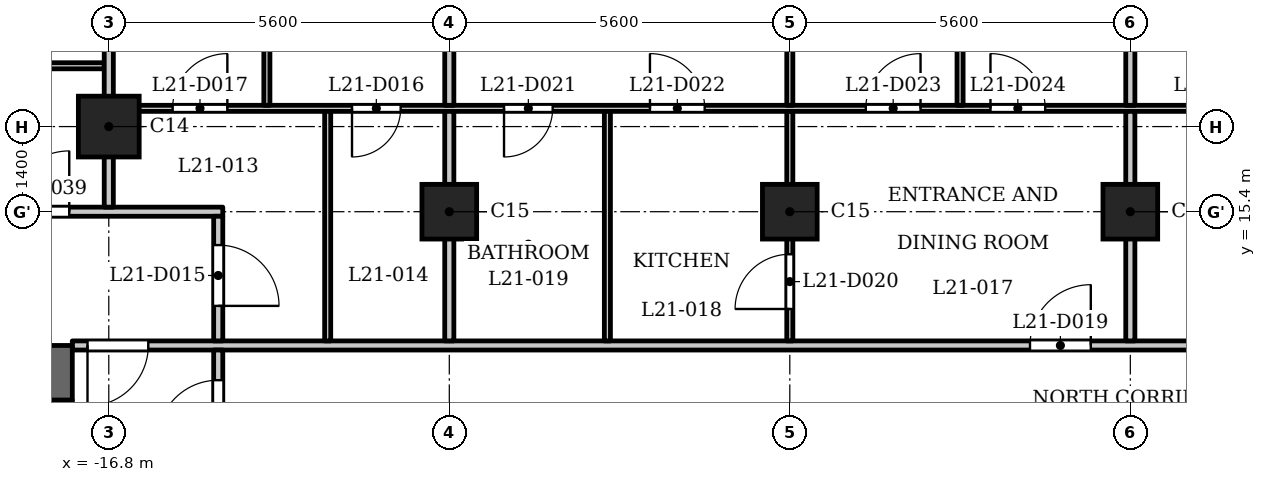
"""IFC4 building model, lengths in metres.
Left out: names, types, materials, properties, quantities, classifications, styles, units other than length and angle.
Written with IfcOpenShell. Run it as: python <this file> out.ifc"""

import sys

from ifc_helpers import new_model, si_unit, direction, frame, frame_2d, origin, origin_2d, place, context, subcontext, project, spatial, rectangle, extrude, element, fill, save


model = new_model("IFC4")
c1 = context("Model", 3, precision=1e-05, world=origin(), true_north=direction((0.0, 1.0)))
c2 = subcontext(c1, "Body", "Model", "MODEL_VIEW")
j1 = project(units=[si_unit("LENGTHUNIT", "METRE"), si_unit("PLANEANGLEUNIT", "RADIAN")], contexts=[c1])
p1 = place(None, origin())
s1 = spatial("IfcSite", under=j1, at=p1, CompositionType="ELEMENT")
p2 = place(p1, origin())
s2 = spatial("IfcBuilding", under=s1, at=p2, CompositionType="ELEMENT")
p3 = place(p2, frame((0.0, 0.0, 86.8)))
s3 = spatial("IfcBuildingStorey", under=s2, at=p3, CompositionType="ELEMENT", Elevation=86.8)
p4 = place(p3, frame((-16.8, 16.8, 0.0), z_axis=(0.0, 0.0, 1.0), x_axis=(1.0, 0.0, 0.0)))
e1 = element("IfcColumn", 1, at=p4, inside=s3, PredefinedType="COLUMN", context=c2, shape_type="SweptSolid", body=[
    extrude(rectangle(XDim=1.0, YDim=1.0, at=origin_2d()), origin(), (0.0, 0.0, 1.0), 3.5),
])
for number, where, z_axis, x_axis in (
    (2, (-11.2, 15.4, 0.0), (0.0, 0.0, 1.0), (1.0, 0.0, 0.0)),
    (3, (-5.6, 15.4, 0.0), (0.0, 0.0, 1.0), (1.0, 0.0, 0.0)),
    (4, (0.0, 15.4, 0.0), (0.0, 0.0, 1.0), (1.0, 0.0, 0.0)),
):
    element("IfcColumn", number, at=place(p3, frame(where, z_axis=z_axis, x_axis=x_axis)), inside=s3, PredefinedType="COLUMN", context=c2, shape_type="SweptSolid", body=[
        extrude(rectangle(XDim=0.9, YDim=0.9, at=origin_2d()), origin(), (0.0, 0.0, 1.0), 3.5),
    ])
p5 = place(p3, frame((-17.4, 12.75, 0.0), z_axis=(0.0, 0.0, 1.0), x_axis=(-1.0, 0.0, 0.0)))
e5 = element("IfcWall", 5, at=p5, inside=s3, PredefinedType="SHEAR", context=c2, shape_type="SweptSolid", body=[
    extrude(rectangle(XDim=10.4, YDim=0.9, at=frame_2d((5.2, 0.0))), origin(), (0.0, 0.0, 1.0), 3.2),
])
p6 = place(p3, frame((-17.6, -12.3, 0.0), z_axis=(0.0, 0.0, 1.0), x_axis=(0.0, 1.0, 0.0)))
e6 = element("IfcWall", 6, at=p6, inside=s3, PredefinedType="SHEAR", context=c2, shape_type="SweptSolid", body=[
    extrude(rectangle(XDim=24.6, YDim=0.4, at=frame_2d((12.3, 0.0))), origin(), (0.0, 0.0, 1.0), 3.2),
])
p7 = place(p6, frame((6.0, 0.0, 0.0)))
e7 = element("IfcOpeningElement", 7, at=p7, cuts=e6, PredefinedType="OPENING", context=c2, shape_type="SweptSolid", body=[
    extrude(rectangle(XDim=1.1, YDim=2.1, at=frame_2d((0.55, 1.05))), frame((0.0, 0.21, 0.0), z_axis=(0.0, -1.0, 0.0), x_axis=(1.0, 0.0, 0.0)), (0.0, 0.0, 1.0), 0.42),
])
p8 = place(p6, frame((8.4, 0.0, 0.0)))
e8 = element("IfcOpeningElement", 8, at=p8, cuts=e6, PredefinedType="OPENING", context=c2, shape_type="SweptSolid", body=[
    extrude(rectangle(XDim=1.1, YDim=2.1, at=frame_2d((0.55, 1.05))), frame((0.0, 0.21, 0.0), z_axis=(0.0, -1.0, 0.0), x_axis=(1.0, 0.0, 0.0)), (0.0, 0.0, 1.0), 0.42),
])
p9 = place(p6, frame((10.8, 0.0, 0.0)))
e9 = element("IfcOpeningElement", 9, at=p9, cuts=e6, PredefinedType="OPENING", context=c2, shape_type="SweptSolid", body=[
    extrude(rectangle(XDim=1.1, YDim=2.1, at=frame_2d((0.55, 1.05))), frame((0.0, 0.21, 0.0), z_axis=(0.0, -1.0, 0.0), x_axis=(1.0, 0.0, 0.0)), (0.0, 0.0, 1.0), 0.42),
])
p10 = place(p6, frame((16.75, 0.0, 0.0)))
e10 = element("IfcOpeningElement", 10, at=p10, cuts=e6, PredefinedType="OPENING", context=c2, shape_type="SweptSolid", body=[
    extrude(rectangle(XDim=0.9, YDim=2.1, at=frame_2d((0.45, 1.05))), frame((0.0, 0.21, 0.0), z_axis=(0.0, -1.0, 0.0), x_axis=(1.0, 0.0, 0.0)), (0.0, 0.0, 1.0), 0.42),
])
p11 = place(p6, frame((22.8, 0.0, 0.0)))
e11 = element("IfcOpeningElement", 11, at=p11, cuts=e6, PredefinedType="OPENING", context=c2, shape_type="SweptSolid", body=[
    extrude(rectangle(XDim=1.1, YDim=2.1, at=frame_2d((0.55, 1.05))), frame((0.0, 0.21, 0.0), z_axis=(0.0, -1.0, 0.0), x_axis=(1.0, 0.0, 0.0)), (0.0, 0.0, 1.0), 0.42),
])
p12 = place(p6, frame((0.7, 0.0, 0.0)))
e12 = element("IfcOpeningElement", 12, at=p12, cuts=e6, PredefinedType="OPENING", context=c2, shape_type="SweptSolid", body=[
    extrude(rectangle(XDim=1.1, YDim=2.1, at=frame_2d((0.55, 1.05))), frame((0.0, 0.21, 0.0), z_axis=(0.0, -1.0, 0.0), x_axis=(1.0, 0.0, 0.0)), (0.0, 0.0, 1.0), 0.42),
])
p13 = place(p6, frame((12.775, 0.0, 0.0)))
e13 = element("IfcOpeningElement", 13, at=p13, cuts=e6, PredefinedType="OPENING", context=c2, shape_type="SweptSolid", body=[
    extrude(rectangle(XDim=1.8, YDim=2.1, at=frame_2d((0.9, 1.05))), frame((0.0, 0.21, 0.0), z_axis=(0.0, -1.0, 0.0), x_axis=(1.0, 0.0, 0.0)), (0.0, 0.0, 1.0), 0.42),
])
p14 = place(p3, frame((-17.4, 13.2, 0.0), z_axis=(0.0, 0.0, 1.0), x_axis=(1.0, 0.0, 0.0)))
e14 = element("IfcWall", 14, at=p14, inside=s3, PredefinedType="PARTITIONING", context=c2, shape_type="SweptSolid", body=[
    extrude(rectangle(XDim=34.8, YDim=0.15, at=frame_2d((17.4, 0.0))), origin(), (0.0, 0.0, 1.0), 3.2),
])
p15 = place(p14, frame((0.25, 0.0, 0.0)))
e15 = element("IfcOpeningElement", 15, at=p15, cuts=e14, PredefinedType="OPENING", context=c2, shape_type="SweptSolid", body=[
    extrude(rectangle(XDim=1.0, YDim=2.1, at=frame_2d((0.5, 1.05))), frame((0.0, 0.085, 0.0), z_axis=(0.0, -1.0, 0.0), x_axis=(1.0, 0.0, 0.0)), (0.0, 0.0, 1.0), 0.17),
])
p16 = place(p14, frame((33.65, 0.0, 0.0)))
e16 = element("IfcOpeningElement", 16, at=p16, cuts=e14, PredefinedType="OPENING", context=c2, shape_type="SweptSolid", body=[
    extrude(rectangle(XDim=1.0, YDim=2.1, at=frame_2d((0.5, 1.05))), frame((0.0, 0.085, 0.0), z_axis=(0.0, -1.0, 0.0), x_axis=(1.0, 0.0, 0.0)), (0.0, 0.0, 1.0), 0.17),
])
p17 = place(p14, frame((15.75, 0.0, 0.0)))
e17 = element("IfcOpeningElement", 17, at=p17, cuts=e14, PredefinedType="OPENING", context=c2, shape_type="SweptSolid", body=[
    extrude(rectangle(XDim=1.0, YDim=2.1, at=frame_2d((0.5, 1.05))), frame((0.0, 0.085, 0.0), z_axis=(0.0, -1.0, 0.0), x_axis=(1.0, 0.0, 0.0)), (0.0, 0.0, 1.0), 0.17),
])
p18 = place(p14, frame((21.35, 0.0, 0.0)))
e18 = element("IfcOpeningElement", 18, at=p18, cuts=e14, PredefinedType="OPENING", context=c2, shape_type="SweptSolid", body=[
    extrude(rectangle(XDim=1.0, YDim=2.1, at=frame_2d((0.5, 1.05))), frame((0.0, 0.085, 0.0), z_axis=(0.0, -1.0, 0.0), x_axis=(1.0, 0.0, 0.0)), (0.0, 0.0, 1.0), 0.17),
])
p19 = place(p3, frame((-27.484, 15.4, 0.0), z_axis=(0.0, 0.0, 1.0), x_axis=(1.0, 0.0, 0.0)))
e19 = element("IfcWall", 19, at=p19, inside=s3, PredefinedType="PARTITIONING", context=c2, shape_type="SweptSolid", body=[
    extrude(rectangle(XDim=12.559, YDim=0.15, at=frame_2d((6.279, 0.0))), origin(), (0.0, 0.0, 1.0), 3.2),
])
p20 = place(p19, frame((9.034, 0.0, 0.0)))
e20 = element("IfcOpeningElement", 20, at=p20, cuts=e19, PredefinedType="OPENING", context=c2, shape_type="SweptSolid", body=[
    extrude(rectangle(XDim=1.0, YDim=2.1, at=frame_2d((0.5, 1.05))), frame((0.0, 0.085, 0.0), z_axis=(0.0, -1.0, 0.0), x_axis=(1.0, 0.0, 0.0)), (0.0, 0.0, 1.0), 0.17),
])
p21 = place(p3, frame((-16.725, 17.1, 0.0), z_axis=(0.0, 0.0, 1.0), x_axis=(1.0, 0.0, 0.0)))
e21 = element("IfcWall", 21, at=p21, inside=s3, PredefinedType="PARTITIONING", context=c2, shape_type="SweptSolid", body=[
    extrude(rectangle(XDim=33.45, YDim=0.1, at=frame_2d((16.725, 0.0))), origin(), (0.0, 0.0, 1.0), 3.2),
])
p22 = place(p21, frame((3.925, 0.0, 0.0)))
e22 = element("IfcOpeningElement", 22, at=p22, cuts=e21, PredefinedType="OPENING", context=c2, shape_type="SweptSolid", body=[
    extrude(rectangle(XDim=0.8, YDim=2.1, at=frame_2d((0.4, 1.05))), frame((0.0, 0.06, 0.0), z_axis=(0.0, -1.0, 0.0), x_axis=(1.0, 0.0, 0.0)), (0.0, 0.0, 1.0), 0.12),
])
p23 = place(p21, frame((0.975, 0.0, 0.0)))
e23 = element("IfcOpeningElement", 23, at=p23, cuts=e21, PredefinedType="OPENING", context=c2, shape_type="SweptSolid", body=[
    extrude(rectangle(XDim=0.9, YDim=2.1, at=frame_2d((0.45, 1.05))), frame((0.0, 0.06, 0.0), z_axis=(0.0, -1.0, 0.0), x_axis=(1.0, 0.0, 0.0)), (0.0, 0.0, 1.0), 0.12),
])
p24 = place(p21, frame((6.425, 0.0, 0.0)))
e24 = element("IfcOpeningElement", 24, at=p24, cuts=e21, PredefinedType="OPENING", context=c2, shape_type="SweptSolid", body=[
    extrude(rectangle(XDim=0.8, YDim=2.1, at=frame_2d((0.4, 1.05))), frame((0.0, 0.06, 0.0), z_axis=(0.0, -1.0, 0.0), x_axis=(1.0, 0.0, 0.0)), (0.0, 0.0, 1.0), 0.12),
])
p25 = place(p21, frame((8.825, 0.0, 0.0)))
e25 = element("IfcOpeningElement", 25, at=p25, cuts=e21, PredefinedType="OPENING", context=c2, shape_type="SweptSolid", body=[
    extrude(rectangle(XDim=0.9, YDim=2.1, at=frame_2d((0.45, 1.05))), frame((0.0, 0.06, 0.0), z_axis=(0.0, -1.0, 0.0), x_axis=(1.0, 0.0, 0.0)), (0.0, 0.0, 1.0), 0.12),
])
p26 = place(p21, frame((12.375, 0.0, 0.0)))
e26 = element("IfcOpeningElement", 26, at=p26, cuts=e21, PredefinedType="OPENING", context=c2, shape_type="SweptSolid", body=[
    extrude(rectangle(XDim=0.9, YDim=2.1, at=frame_2d((0.45, 1.05))), frame((0.0, 0.06, 0.0), z_axis=(0.0, -1.0, 0.0), x_axis=(1.0, 0.0, 0.0)), (0.0, 0.0, 1.0), 0.12),
])
p27 = place(p21, frame((14.425, 0.0, 0.0)))
e27 = element("IfcOpeningElement", 27, at=p27, cuts=e21, PredefinedType="OPENING", context=c2, shape_type="SweptSolid", body=[
    extrude(rectangle(XDim=0.9, YDim=2.1, at=frame_2d((0.45, 1.05))), frame((0.0, 0.06, 0.0), z_axis=(0.0, -1.0, 0.0), x_axis=(1.0, 0.0, 0.0)), (0.0, 0.0, 1.0), 0.12),
])
p28 = place(p21, frame((26.225, 0.0, 0.0)))
e28 = element("IfcOpeningElement", 28, at=p28, cuts=e21, PredefinedType="OPENING", context=c2, shape_type="SweptSolid", body=[
    extrude(rectangle(XDim=0.8, YDim=2.1, at=frame_2d((0.4, 1.05))), frame((0.0, 0.06, 0.0), z_axis=(0.0, -1.0, 0.0), x_axis=(1.0, 0.0, 0.0)), (0.0, 0.0, 1.0), 0.12),
])
p29 = place(p21, frame((23.025, 0.0, 0.0)))
e29 = element("IfcOpeningElement", 29, at=p29, cuts=e21, PredefinedType="OPENING", context=c2, shape_type="SweptSolid", body=[
    extrude(rectangle(XDim=0.9, YDim=2.1, at=frame_2d((0.45, 1.05))), frame((0.0, 0.06, 0.0), z_axis=(0.0, -1.0, 0.0), x_axis=(1.0, 0.0, 0.0)), (0.0, 0.0, 1.0), 0.12),
])
p30 = place(p21, frame((17.775, 0.0, 0.0)))
e30 = element("IfcOpeningElement", 30, at=p30, cuts=e21, PredefinedType="OPENING", context=c2, shape_type="SweptSolid", body=[
    extrude(rectangle(XDim=0.9, YDim=2.1, at=frame_2d((0.45, 1.05))), frame((0.0, 0.06, 0.0), z_axis=(0.0, -1.0, 0.0), x_axis=(1.0, 0.0, 0.0)), (0.0, 0.0, 1.0), 0.12),
])
p31 = place(p21, frame((20.025, 0.0, 0.0)))
e31 = element("IfcOpeningElement", 31, at=p31, cuts=e21, PredefinedType="OPENING", context=c2, shape_type="SweptSolid", body=[
    extrude(rectangle(XDim=0.9, YDim=2.1, at=frame_2d((0.45, 1.05))), frame((0.0, 0.06, 0.0), z_axis=(0.0, -1.0, 0.0), x_axis=(1.0, 0.0, 0.0)), (0.0, 0.0, 1.0), 0.12),
])
p32 = place(p21, frame((28.825, 0.0, 0.0)))
e32 = element("IfcOpeningElement", 32, at=p32, cuts=e21, PredefinedType="OPENING", context=c2, shape_type="SweptSolid", body=[
    extrude(rectangle(XDim=0.8, YDim=2.1, at=frame_2d((0.4, 1.05))), frame((0.0, 0.06, 0.0), z_axis=(0.0, -1.0, 0.0), x_axis=(1.0, 0.0, 0.0)), (0.0, 0.0, 1.0), 0.12),
])
p33 = place(p21, frame((31.975, 0.0, 0.0)))
e33 = element("IfcOpeningElement", 33, at=p33, cuts=e21, PredefinedType="OPENING", context=c2, shape_type="SweptSolid", body=[
    extrude(rectangle(XDim=0.9, YDim=2.1, at=frame_2d((0.45, 1.05))), frame((0.0, 0.06, 0.0), z_axis=(0.0, -1.0, 0.0), x_axis=(1.0, 0.0, 0.0)), (0.0, 0.0, 1.0), 0.12),
])
p34 = place(p3, frame((-26.554, 17.8, 0.0), z_axis=(0.0, 0.0, 1.0), x_axis=(1.0, 0.0, 0.0)))
e34 = element("IfcWall", 34, at=p34, inside=s3, PredefinedType="PARTITIONING", context=c2, shape_type="SweptSolid", body=[
    extrude(rectangle(XDim=9.679, YDim=0.1, at=frame_2d((4.84, 0.0))), origin(), (0.0, 0.0, 1.0), 3.2),
])
p35 = place(p34, frame((2.786, 0.0, 0.0)))
e35 = element("IfcOpeningElement", 35, at=p35, cuts=e34, PredefinedType="OPENING", context=c2, shape_type="SweptSolid", body=[
    extrude(rectangle(XDim=0.8, YDim=2.1, at=frame_2d((0.4, 1.05))), frame((0.0, 0.06, 0.0), z_axis=(0.0, -1.0, 0.0), x_axis=(1.0, 0.0, 0.0)), (0.0, 0.0, 1.0), 0.12),
])
p36 = place(p34, frame((7.204, 0.0, 0.0)))
e36 = element("IfcOpeningElement", 36, at=p36, cuts=e34, PredefinedType="OPENING", context=c2, shape_type="SweptSolid", body=[
    extrude(rectangle(XDim=0.9, YDim=2.1, at=frame_2d((0.45, 1.05))), frame((0.0, 0.06, 0.0), z_axis=(0.0, -1.0, 0.0), x_axis=(1.0, 0.0, 0.0)), (0.0, 0.0, 1.0), 0.12),
])
p37 = place(p3, frame((-16.8, 15.475, 0.0), z_axis=(0.0, 0.0, 1.0), x_axis=(0.0, 1.0, 0.0)))
e37 = element("IfcWall", 37, at=p37, inside=s3, PredefinedType="PARTITIONING", context=c2, shape_type="SweptSolid", body=[
    extrude(rectangle(XDim=7.555, YDim=0.15, at=frame_2d((3.777, 0.0))), origin(), (0.0, 0.0, 1.0), 3.2),
])
p38 = place(p3, frame((-15.0, 6.769, 0.0), z_axis=(0.0, 0.0, 1.0), x_axis=(0.0, 1.0, 0.0)))
e38 = element("IfcWall", 38, at=p38, inside=s3, PredefinedType="PARTITIONING", context=c2, shape_type="SweptSolid", body=[
    extrude(rectangle(XDim=6.356, YDim=0.15, at=frame_2d((3.178, 0.0))), origin(), (0.0, 0.0, 1.0), 3.2),
])
p39 = place(p38, frame((4.86, 0.0, 0.0)))
e39 = element("IfcOpeningElement", 39, at=p39, cuts=e38, PredefinedType="OPENING", context=c2, shape_type="SweptSolid", body=[
    extrude(rectangle(XDim=1.0, YDim=2.1, at=frame_2d((0.5, 1.05))), frame((0.0, 0.085, 0.0), z_axis=(0.0, -1.0, 0.0), x_axis=(1.0, 0.0, 0.0)), (0.0, 0.0, 1.0), 0.17),
])
p40 = place(p3, frame((-15.0, 13.275, 0.0), z_axis=(0.0, 0.0, 1.0), x_axis=(0.0, 1.0, 0.0)))
e40 = element("IfcWall", 40, at=p40, inside=s3, PredefinedType="PARTITIONING", context=c2, shape_type="SweptSolid", body=[
    extrude(rectangle(XDim=2.05, YDim=0.15, at=frame_2d((1.025, 0.0))), origin(), (0.0, 0.0, 1.0), 3.2),
])
p41 = place(p40, frame((0.576, 0.0, 0.0)))
e41 = element("IfcOpeningElement", 41, at=p41, cuts=e40, PredefinedType="OPENING", context=c2, shape_type="SweptSolid", body=[
    extrude(rectangle(XDim=1.0, YDim=2.1, at=frame_2d((0.5, 1.05))), frame((0.0, 0.085, 0.0), z_axis=(0.0, -1.0, 0.0), x_axis=(1.0, 0.0, 0.0)), (0.0, 0.0, 1.0), 0.17),
])
p42 = place(p3, frame((-14.2, 17.15, 0.0), z_axis=(0.0, 0.0, 1.0), x_axis=(0.0, 1.0, 0.0)))
e42 = element("IfcWall", 42, at=p42, inside=s3, PredefinedType="PARTITIONING", context=c2, shape_type="SweptSolid", body=[
    extrude(rectangle(XDim=4.93, YDim=0.1, at=frame_2d((2.465, 0.0))), origin(), (0.0, 0.0, 1.0), 3.2),
])
p43 = place(p42, frame((3.6, 0.0, 0.0)))
e43 = element("IfcOpeningElement", 43, at=p43, cuts=e42, PredefinedType="OPENING", context=c2, shape_type="SweptSolid", body=[
    extrude(rectangle(XDim=0.9, YDim=2.1, at=frame_2d((0.45, 1.05))), frame((0.0, 0.06, 0.0), z_axis=(0.0, -1.0, 0.0), x_axis=(1.0, 0.0, 0.0)), (0.0, 0.0, 1.0), 0.12),
])
p44 = place(p3, frame((-13.2, 13.275, 0.0), z_axis=(0.0, 0.0, 1.0), x_axis=(0.0, 1.0, 0.0)))
e44 = element("IfcWall", 44, at=p44, inside=s3, PredefinedType="PARTITIONING", context=c2, shape_type="SweptSolid", body=[
    extrude(rectangle(XDim=3.775, YDim=0.1, at=frame_2d((1.888, 0.0))), origin(), (0.0, 0.0, 1.0), 3.2),
])
p45 = place(p3, frame((-11.2, 13.275, 0.0), z_axis=(0.0, 0.0, 1.0), x_axis=(0.0, 1.0, 0.0)))
e45 = element("IfcWall", 45, at=p45, inside=s3, PredefinedType="PARTITIONING", context=c2, shape_type="SweptSolid", body=[
    extrude(rectangle(XDim=3.775, YDim=0.15, at=frame_2d((1.888, 0.0))), origin(), (0.0, 0.0, 1.0), 3.2),
])
p46 = place(p3, frame((-11.2, 17.15, 0.0), z_axis=(0.0, 0.0, 1.0), x_axis=(0.0, 1.0, 0.0)))
e46 = element("IfcWall", 46, at=p46, inside=s3, PredefinedType="PARTITIONING", context=c2, shape_type="SweptSolid", body=[
    extrude(rectangle(XDim=5.88, YDim=0.15, at=frame_2d((2.94, 0.0))), origin(), (0.0, 0.0, 1.0), 3.2),
])
p47 = place(p3, frame((-8.6, 13.275, 0.0), z_axis=(0.0, 0.0, 1.0), x_axis=(0.0, 1.0, 0.0)))
e47 = element("IfcWall", 47, at=p47, inside=s3, PredefinedType="PARTITIONING", context=c2, shape_type="SweptSolid", body=[
    extrude(rectangle(XDim=3.775, YDim=0.1, at=frame_2d((1.888, 0.0))), origin(), (0.0, 0.0, 1.0), 3.2),
])
p48 = place(p3, frame((-5.6, 13.275, 0.0), z_axis=(0.0, 0.0, 1.0), x_axis=(0.0, 1.0, 0.0)))
e48 = element("IfcWall", 48, at=p48, inside=s3, PredefinedType="PARTITIONING", context=c2, shape_type="SweptSolid", body=[
    extrude(rectangle(XDim=3.775, YDim=0.1, at=frame_2d((1.888, 0.0))), origin(), (0.0, 0.0, 1.0), 3.2),
])
p49 = place(p48, frame((0.525, 0.0, 0.0)))
e49 = element("IfcOpeningElement", 49, at=p49, cuts=e48, PredefinedType="OPENING", context=c2, shape_type="SweptSolid", body=[
    extrude(rectangle(XDim=0.9, YDim=2.1, at=frame_2d((0.45, 1.05))), frame((0.0, 0.06, 0.0), z_axis=(0.0, -1.0, 0.0), x_axis=(1.0, 0.0, 0.0)), (0.0, 0.0, 1.0), 0.12),
])
p50 = place(p3, frame((-5.6, 17.15, 0.0), z_axis=(0.0, 0.0, 1.0), x_axis=(0.0, 1.0, 0.0)))
e50 = element("IfcWall", 50, at=p50, inside=s3, PredefinedType="PARTITIONING", context=c2, shape_type="SweptSolid", body=[
    extrude(rectangle(XDim=5.88, YDim=0.1, at=frame_2d((2.94, 0.0))), origin(), (0.0, 0.0, 1.0), 3.2),
])
p51 = place(p3, frame((-2.8, 17.15, 0.0), z_axis=(0.0, 0.0, 1.0), x_axis=(0.0, 1.0, 0.0)))
e51 = element("IfcWall", 51, at=p51, inside=s3, PredefinedType="PARTITIONING", context=c2, shape_type="SweptSolid", body=[
    extrude(rectangle(XDim=4.93, YDim=0.1, at=frame_2d((2.465, 0.0))), origin(), (0.0, 0.0, 1.0), 3.2),
])
p52 = place(p3, frame((0.0, 13.275, 0.0), z_axis=(0.0, 0.0, 1.0), x_axis=(0.0, 1.0, 0.0)))
e52 = element("IfcWall", 52, at=p52, inside=s3, PredefinedType="PARTITIONING", context=c2, shape_type="SweptSolid", body=[
    extrude(rectangle(XDim=3.775, YDim=0.15, at=frame_2d((1.888, 0.0))), origin(), (0.0, 0.0, 1.0), 3.2),
])
p53 = place(p3, frame((0.0, 17.15, 0.0), z_axis=(0.0, 0.0, 1.0), x_axis=(0.0, 1.0, 0.0)))
e53 = element("IfcWall", 53, at=p53, inside=s3, PredefinedType="PARTITIONING", context=c2, shape_type="SweptSolid", body=[
    extrude(rectangle(XDim=5.88, YDim=0.15, at=frame_2d((2.94, 0.0))), origin(), (0.0, 0.0, 1.0), 3.2),
])
p54 = place(p39, origin())
e54 = element("IfcDoor", 54, at=p54, inside=s3, OperationType="SINGLE_SWING_RIGHT", PredefinedType="DOOR", context=c2, shape_type="SweptSolid", body=[
    extrude(rectangle(XDim=1.0, YDim=2.1, at=frame_2d((0.5, 1.05))), frame((0.0, 0.025, 0.0), z_axis=(0.0, -1.0, 0.0), x_axis=(1.0, 0.0, 0.0)), (0.0, 0.0, 1.0), 0.05),
])
fill(e39, e54)
p55 = place(p15, origin())
e55 = element("IfcDoor", 55, at=p55, inside=s3, OperationType="SINGLE_SWING_LEFT", PredefinedType="DOOR", context=c2, shape_type="SweptSolid", body=[
    extrude(rectangle(XDim=1.0, YDim=2.1, at=frame_2d((0.5, 1.05))), frame((0.0, 0.025, 0.0), z_axis=(0.0, -1.0, 0.0), x_axis=(1.0, 0.0, 0.0)), (0.0, 0.0, 1.0), 0.05),
])
fill(e15, e55)
p56 = place(p41, origin())
e56 = element("IfcDoor", 56, at=p56, inside=s3, OperationType="SINGLE_SWING_LEFT", PredefinedType="DOOR", context=c2, shape_type="SweptSolid", body=[
    extrude(rectangle(XDim=1.0, YDim=2.1, at=frame_2d((0.5, 1.05))), frame((0.0, 0.025, 0.0), z_axis=(0.0, -1.0, 0.0), x_axis=(1.0, 0.0, 0.0)), (0.0, 0.0, 1.0), 0.05),
])
fill(e41, e56)
p57 = place(p22, origin())
e57 = element("IfcDoor", 57, at=p57, inside=s3, OperationType="SINGLE_SWING_LEFT", PredefinedType="DOOR", context=c2, shape_type="SweptSolid", body=[
    extrude(rectangle(XDim=0.8, YDim=2.1, at=frame_2d((0.4, 1.05))), frame((0.0, 0.025, 0.0), z_axis=(0.0, -1.0, 0.0), x_axis=(1.0, 0.0, 0.0)), (0.0, 0.0, 1.0), 0.05),
])
fill(e22, e57)
p58 = place(p23, origin())
e58 = element("IfcDoor", 58, at=p58, inside=s3, OperationType="SINGLE_SWING_LEFT", PredefinedType="DOOR", context=c2, shape_type="SweptSolid", body=[
    extrude(rectangle(XDim=0.9, YDim=2.1, at=frame_2d((0.45, 1.05))), frame((0.0, 0.025, 0.0), z_axis=(0.0, -1.0, 0.0), x_axis=(1.0, 0.0, 0.0)), (0.0, 0.0, 1.0), 0.05),
])
fill(e23, e58)
p59 = place(p17, origin())
e59 = element("IfcDoor", 59, at=p59, inside=s3, OperationType="SINGLE_SWING_LEFT", PredefinedType="DOOR", context=c2, shape_type="SweptSolid", body=[
    extrude(rectangle(XDim=1.0, YDim=2.1, at=frame_2d((0.5, 1.05))), frame((0.0, 0.025, 0.0), z_axis=(0.0, -1.0, 0.0), x_axis=(1.0, 0.0, 0.0)), (0.0, 0.0, 1.0), 0.05),
])
fill(e17, e59)
p60 = place(p49, origin())
e60 = element("IfcDoor", 60, at=p60, inside=s3, OperationType="SINGLE_SWING_RIGHT", PredefinedType="DOOR", context=c2, shape_type="SweptSolid", body=[
    extrude(rectangle(XDim=0.9, YDim=2.1, at=frame_2d((0.45, 1.05))), frame((0.0, 0.025, 0.0), z_axis=(0.0, -1.0, 0.0), x_axis=(1.0, 0.0, 0.0)), (0.0, 0.0, 1.0), 0.05),
])
fill(e49, e60)
p61 = place(p24, origin())
e61 = element("IfcDoor", 61, at=p61, inside=s3, OperationType="SINGLE_SWING_LEFT", PredefinedType="DOOR", context=c2, shape_type="SweptSolid", body=[
    extrude(rectangle(XDim=0.8, YDim=2.1, at=frame_2d((0.4, 1.05))), frame((0.0, 0.025, 0.0), z_axis=(0.0, -1.0, 0.0), x_axis=(1.0, 0.0, 0.0)), (0.0, 0.0, 1.0), 0.05),
])
fill(e24, e61)
p62 = place(p25, origin())
e62 = element("IfcDoor", 62, at=p62, inside=s3, OperationType="SINGLE_SWING_RIGHT", PredefinedType="DOOR", context=c2, shape_type="SweptSolid", body=[
    extrude(rectangle(XDim=0.9, YDim=2.1, at=frame_2d((0.45, 1.05))), frame((0.0, 0.025, 0.0), z_axis=(0.0, -1.0, 0.0), x_axis=(1.0, 0.0, 0.0)), (0.0, 0.0, 1.0), 0.05),
])
fill(e25, e62)
p63 = place(p26, origin())
e63 = element("IfcDoor", 63, at=p63, inside=s3, OperationType="SINGLE_SWING_LEFT", PredefinedType="DOOR", context=c2, shape_type="SweptSolid", body=[
    extrude(rectangle(XDim=0.9, YDim=2.1, at=frame_2d((0.45, 1.05))), frame((0.0, 0.025, 0.0), z_axis=(0.0, -1.0, 0.0), x_axis=(1.0, 0.0, 0.0)), (0.0, 0.0, 1.0), 0.05),
])
fill(e26, e63)
p64 = place(p27, origin())
e64 = element("IfcDoor", 64, at=p64, inside=s3, OperationType="SINGLE_SWING_RIGHT", PredefinedType="DOOR", context=c2, shape_type="SweptSolid", body=[
    extrude(rectangle(XDim=0.9, YDim=2.1, at=frame_2d((0.45, 1.05))), frame((0.0, 0.025, 0.0), z_axis=(0.0, -1.0, 0.0), x_axis=(1.0, 0.0, 0.0)), (0.0, 0.0, 1.0), 0.05),
])
fill(e27, e64)
p65 = place(p20, origin())
e65 = element("IfcDoor", 65, at=p65, inside=s3, OperationType="SINGLE_SWING_LEFT", PredefinedType="DOOR", context=c2, shape_type="SweptSolid", body=[
    extrude(rectangle(XDim=1.0, YDim=2.1, at=frame_2d((0.5, 1.05))), frame((0.0, 0.025, 0.0), z_axis=(0.0, -1.0, 0.0), x_axis=(1.0, 0.0, 0.0)), (0.0, 0.0, 1.0), 0.05),
])
fill(e20, e65)
save(model, sys.argv[1])
